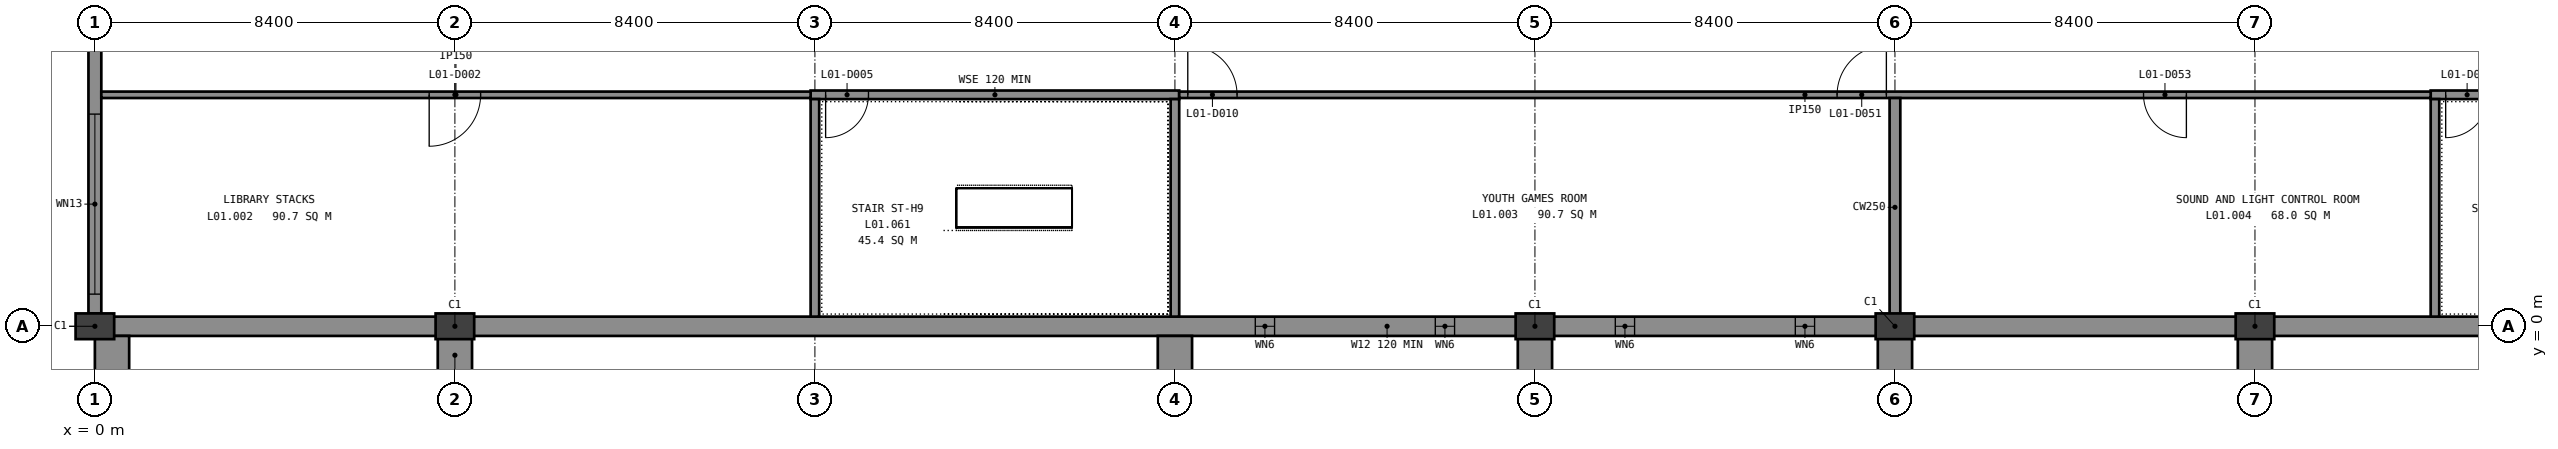
"""IFC4 building model, lengths in metres.
Left out: names, types, materials, properties, quantities, classifications, styles, units other than length and angle.
Written with IfcOpenShell. Run it as: python <this file> out.ifc"""

import sys

from ifc_helpers import new_model, si_unit, direction, frame, frame_2d, origin, origin_2d, place, context, subcontext, project, spatial, rectangle, extrude, element, fill, save


model = new_model("IFC4")
c1 = context("Model", 3, precision=1e-05, world=origin(), true_north=direction((0.0, 1.0)))
c2 = subcontext(c1, "Body", "Model", "MODEL_VIEW")
j1 = project(units=[si_unit("LENGTHUNIT", "METRE"), si_unit("PLANEANGLEUNIT", "RADIAN")], contexts=[c1])
p1 = place(None, origin())
s1 = spatial("IfcSite", under=j1, at=p1, CompositionType="ELEMENT")
p2 = place(p1, origin())
s2 = spatial("IfcBuilding", under=s1, at=p2, CompositionType="ELEMENT")
p3 = place(p2, frame((0.0, 0.0, 5.4)))
s3 = spatial("IfcBuildingStorey", under=s2, at=p3, CompositionType="ELEMENT", Elevation=5.4)
for number, where, z_axis, x_axis in (
    (1, (0.0, 0.0, -0.3), (0.0, 0.0, 1.0), (1.0, 0.0, 0.0)),
    (2, (8.4, 0.0, -0.3), (0.0, 0.0, 1.0), (1.0, 0.0, 0.0)),
    (3, (33.6, 0.0, -0.3), (0.0, 0.0, 1.0), (1.0, 0.0, 0.0)),
    (4, (42.0, 0.0, -0.3), (0.0, 0.0, 1.0), (1.0, 0.0, 0.0)),
    (5, (50.4, 0.0, -0.3), (0.0, 0.0, 1.0), (1.0, 0.0, 0.0)),
):
    element("IfcColumn", number, at=place(p3, frame(where, z_axis=z_axis, x_axis=x_axis)), inside=s3, PredefinedType="PILASTER", context=c2, shape_type="SweptSolid", body=[
        extrude(rectangle(XDim=0.9, YDim=0.6, at=origin_2d()), origin(), (0.0, 0.0, 1.0), 4.55),
    ])
p4 = place(p3, frame((0.0, 0.0, -0.3), z_axis=(0.0, 0.0, 1.0), x_axis=(1.0, 0.0, 0.0)))
e6 = element("IfcWall", 6, at=p4, inside=s3, PredefinedType="SOLIDWALL", context=c2, shape_type="SweptSolid", body=[
    extrude(rectangle(XDim=168.0, YDim=0.45, at=frame_2d((84.0, 0.0))), origin(), (0.0, 0.0, 1.0), 4.55),
])
p5 = place(p4, frame((27.075, 0.0, 1.5)))
e7 = element("IfcOpeningElement", 7, at=p5, cuts=e6, PredefinedType="OPENING", context=c2, shape_type="SweptSolid", body=[
    extrude(rectangle(XDim=0.45, YDim=2.4, at=frame_2d((0.225, 1.2))), frame((0.0, 0.235, 0.0), z_axis=(0.0, -1.0, 0.0), x_axis=(1.0, 0.0, 0.0)), (0.0, 0.0, 1.0), 0.47),
])
p6 = place(p4, frame((31.275, 0.0, 1.5)))
e8 = element("IfcOpeningElement", 8, at=p6, cuts=e6, PredefinedType="OPENING", context=c2, shape_type="SweptSolid", body=[
    extrude(rectangle(XDim=0.45, YDim=2.4, at=frame_2d((0.225, 1.2))), frame((0.0, 0.235, 0.0), z_axis=(0.0, -1.0, 0.0), x_axis=(1.0, 0.0, 0.0)), (0.0, 0.0, 1.0), 0.47),
])
p7 = place(p4, frame((35.475, 0.0, 1.5)))
e9 = element("IfcOpeningElement", 9, at=p7, cuts=e6, PredefinedType="OPENING", context=c2, shape_type="SweptSolid", body=[
    extrude(rectangle(XDim=0.45, YDim=2.4, at=frame_2d((0.225, 1.2))), frame((0.0, 0.235, 0.0), z_axis=(0.0, -1.0, 0.0), x_axis=(1.0, 0.0, 0.0)), (0.0, 0.0, 1.0), 0.47),
])
p8 = place(p4, frame((39.675, 0.0, 1.5)))
e10 = element("IfcOpeningElement", 10, at=p8, cuts=e6, PredefinedType="OPENING", context=c2, shape_type="SweptSolid", body=[
    extrude(rectangle(XDim=0.45, YDim=2.4, at=frame_2d((0.225, 1.2))), frame((0.0, 0.235, 0.0), z_axis=(0.0, -1.0, 0.0), x_axis=(1.0, 0.0, 0.0)), (0.0, 0.0, 1.0), 0.47),
])
p9 = place(p4, frame((94.275, 0.0, 1.5)))
e11 = element("IfcOpeningElement", 11, at=p9, cuts=e6, PredefinedType="OPENING", context=c2, shape_type="SweptSolid", body=[
    extrude(rectangle(XDim=0.45, YDim=2.4, at=frame_2d((0.225, 1.2))), frame((0.0, 0.235, 0.0), z_axis=(0.0, -1.0, 0.0), x_axis=(1.0, 0.0, 0.0)), (0.0, 0.0, 1.0), 0.47),
])
p10 = place(p4, frame((98.475, 0.0, 1.5)))
e12 = element("IfcOpeningElement", 12, at=p10, cuts=e6, PredefinedType="OPENING", context=c2, shape_type="SweptSolid", body=[
    extrude(rectangle(XDim=0.45, YDim=2.4, at=frame_2d((0.225, 1.2))), frame((0.0, 0.235, 0.0), z_axis=(0.0, -1.0, 0.0), x_axis=(1.0, 0.0, 0.0)), (0.0, 0.0, 1.0), 0.47),
])
p11 = place(p4, frame((102.675, 0.0, 1.5)))
e13 = element("IfcOpeningElement", 13, at=p11, cuts=e6, PredefinedType="OPENING", context=c2, shape_type="SweptSolid", body=[
    extrude(rectangle(XDim=0.45, YDim=2.4, at=frame_2d((0.225, 1.2))), frame((0.0, 0.235, 0.0), z_axis=(0.0, -1.0, 0.0), x_axis=(1.0, 0.0, 0.0)), (0.0, 0.0, 1.0), 0.47),
])
p12 = place(p4, frame((106.875, 0.0, 1.5)))
e14 = element("IfcOpeningElement", 14, at=p12, cuts=e6, PredefinedType="OPENING", context=c2, shape_type="SweptSolid", body=[
    extrude(rectangle(XDim=0.45, YDim=2.4, at=frame_2d((0.225, 1.2))), frame((0.0, 0.235, 0.0), z_axis=(0.0, -1.0, 0.0), x_axis=(1.0, 0.0, 0.0)), (0.0, 0.0, 1.0), 0.47),
])
p13 = place(p4, frame((111.075, 0.0, 1.5)))
e15 = element("IfcOpeningElement", 15, at=p13, cuts=e6, PredefinedType="OPENING", context=c2, shape_type="SweptSolid", body=[
    extrude(rectangle(XDim=0.45, YDim=2.4, at=frame_2d((0.225, 1.2))), frame((0.0, 0.235, 0.0), z_axis=(0.0, -1.0, 0.0), x_axis=(1.0, 0.0, 0.0)), (0.0, 0.0, 1.0), 0.47),
])
p14 = place(p4, frame((115.275, 0.0, 1.5)))
e16 = element("IfcOpeningElement", 16, at=p14, cuts=e6, PredefinedType="OPENING", context=c2, shape_type="SweptSolid", body=[
    extrude(rectangle(XDim=0.45, YDim=2.4, at=frame_2d((0.225, 1.2))), frame((0.0, 0.235, 0.0), z_axis=(0.0, -1.0, 0.0), x_axis=(1.0, 0.0, 0.0)), (0.0, 0.0, 1.0), 0.47),
])
p15 = place(p4, frame((127.875, 0.0, 1.5)))
e17 = element("IfcOpeningElement", 17, at=p15, cuts=e6, PredefinedType="OPENING", context=c2, shape_type="SweptSolid", body=[
    extrude(rectangle(XDim=0.45, YDim=2.4, at=frame_2d((0.225, 1.2))), frame((0.0, 0.235, 0.0), z_axis=(0.0, -1.0, 0.0), x_axis=(1.0, 0.0, 0.0)), (0.0, 0.0, 1.0), 0.47),
])
p16 = place(p4, frame((132.075, 0.0, 1.5)))
e18 = element("IfcOpeningElement", 18, at=p16, cuts=e6, PredefinedType="OPENING", context=c2, shape_type="SweptSolid", body=[
    extrude(rectangle(XDim=0.45, YDim=2.4, at=frame_2d((0.225, 1.2))), frame((0.0, 0.235, 0.0), z_axis=(0.0, -1.0, 0.0), x_axis=(1.0, 0.0, 0.0)), (0.0, 0.0, 1.0), 0.47),
])
p17 = place(p4, frame((136.275, 0.0, 1.5)))
e19 = element("IfcOpeningElement", 19, at=p17, cuts=e6, PredefinedType="OPENING", context=c2, shape_type="SweptSolid", body=[
    extrude(rectangle(XDim=0.45, YDim=2.4, at=frame_2d((0.225, 1.2))), frame((0.0, 0.235, 0.0), z_axis=(0.0, -1.0, 0.0), x_axis=(1.0, 0.0, 0.0)), (0.0, 0.0, 1.0), 0.47),
])
p18 = place(p4, frame((140.475, 0.0, 1.5)))
e20 = element("IfcOpeningElement", 20, at=p18, cuts=e6, PredefinedType="OPENING", context=c2, shape_type="SweptSolid", body=[
    extrude(rectangle(XDim=0.45, YDim=2.4, at=frame_2d((0.225, 1.2))), frame((0.0, 0.235, 0.0), z_axis=(0.0, -1.0, 0.0), x_axis=(1.0, 0.0, 0.0)), (0.0, 0.0, 1.0), 0.47),
])
p19 = place(p4, frame((144.675, 0.0, 1.5)))
e21 = element("IfcOpeningElement", 21, at=p19, cuts=e6, PredefinedType="OPENING", context=c2, shape_type="SweptSolid", body=[
    extrude(rectangle(XDim=0.45, YDim=2.4, at=frame_2d((0.225, 1.2))), frame((0.0, 0.235, 0.0), z_axis=(0.0, -1.0, 0.0), x_axis=(1.0, 0.0, 0.0)), (0.0, 0.0, 1.0), 0.47),
])
p20 = place(p4, frame((148.875, 0.0, 1.5)))
e22 = element("IfcOpeningElement", 22, at=p20, cuts=e6, PredefinedType="OPENING", context=c2, shape_type="SweptSolid", body=[
    extrude(rectangle(XDim=0.45, YDim=2.4, at=frame_2d((0.225, 1.2))), frame((0.0, 0.235, 0.0), z_axis=(0.0, -1.0, 0.0), x_axis=(1.0, 0.0, 0.0)), (0.0, 0.0, 1.0), 0.47),
])
p21 = place(p4, frame((153.075, 0.0, 1.5)))
e23 = element("IfcOpeningElement", 23, at=p21, cuts=e6, PredefinedType="OPENING", context=c2, shape_type="SweptSolid", body=[
    extrude(rectangle(XDim=0.45, YDim=2.4, at=frame_2d((0.225, 1.2))), frame((0.0, 0.235, 0.0), z_axis=(0.0, -1.0, 0.0), x_axis=(1.0, 0.0, 0.0)), (0.0, 0.0, 1.0), 0.47),
])
p22 = place(p4, frame((157.275, 0.0, 1.5)))
e24 = element("IfcOpeningElement", 24, at=p22, cuts=e6, PredefinedType="OPENING", context=c2, shape_type="SweptSolid", body=[
    extrude(rectangle(XDim=0.45, YDim=2.4, at=frame_2d((0.225, 1.2))), frame((0.0, 0.235, 0.0), z_axis=(0.0, -1.0, 0.0), x_axis=(1.0, 0.0, 0.0)), (0.0, 0.0, 1.0), 0.47),
])
p23 = place(p3, frame((0.0, 0.3, 0.0), z_axis=(0.0, 0.0, 1.0), x_axis=(0.0, 1.0, 0.0)))
e25 = element("IfcWall", 25, at=p23, inside=s3, PredefinedType="STANDARD", context=c2, shape_type="SweptSolid", body=[
    extrude(rectangle(XDim=7.675, YDim=0.3, at=frame_2d((3.837, 0.0))), origin(), (0.0, 0.0, 1.0), 3.6),
])
p24 = place(p23, frame((0.45, 0.0, 2.4)))
e26 = element("IfcOpeningElement", 26, at=p24, cuts=e25, PredefinedType="OPENING", context=c2, shape_type="SweptSolid", body=[
    extrude(rectangle(XDim=4.2, YDim=0.9, at=frame_2d((2.1, 0.45))), frame((0.0, 0.16, 0.0), z_axis=(0.0, -1.0, 0.0), x_axis=(1.0, 0.0, 0.0)), (0.0, 0.0, 1.0), 0.32),
])
for number, where, z_axis, x_axis in (
    (27, (0.4, -0.225, -0.3), (0.0, 0.0, 1.0), (0.0, -1.0, 0.0)),
    (28, (8.4, -0.225, -0.3), (0.0, 0.0, 1.0), (0.0, -1.0, 0.0)),
    (29, (25.2, -0.225, -0.3), (0.0, 0.0, 1.0), (0.0, -1.0, 0.0)),
    (30, (33.6, -0.225, -0.3), (0.0, 0.0, 1.0), (0.0, -1.0, 0.0)),
    (31, (42.0, -0.225, -0.3), (0.0, 0.0, 1.0), (0.0, -1.0, 0.0)),
    (32, (50.4, -0.225, -0.3), (0.0, 0.0, 1.0), (0.0, -1.0, 0.0)),
):
    element("IfcWall", number, at=place(p3, frame(where, z_axis=z_axis, x_axis=x_axis)), inside=s3, PredefinedType="SOLIDWALL", context=c2, shape_type="SweptSolid", body=[
        extrude(rectangle(XDim=0.9, YDim=0.8, at=frame_2d((0.45, 0.0))), origin(), (0.0, 0.0, 1.0), 4.55),
    ])
p25 = place(p3, frame((54.5, 5.4, -0.3), z_axis=(0.0, 0.0, 1.0), x_axis=(1.0, 0.0, 0.0)))
e33 = element("IfcWall", 33, at=p25, inside=s3, PredefinedType="SHEAR", context=c2, shape_type="SweptSolid", body=[
    extrude(rectangle(XDim=8.6, YDim=0.2, at=frame_2d((4.3, 0.0))), origin(), (0.0, 0.0, 1.0), 4.5),
])
p26 = place(p25, frame((0.35, 0.0, 0.3)))
e34 = element("IfcOpeningElement", 34, at=p26, cuts=e33, PredefinedType="OPENING", context=c2, shape_type="SweptSolid", body=[
    extrude(rectangle(XDim=1.0, YDim=2.1, at=frame_2d((0.5, 1.05))), frame((0.0, 0.11, 0.0), z_axis=(0.0, -1.0, 0.0), x_axis=(1.0, 0.0, 0.0)), (0.0, 0.0, 1.0), 0.22),
])
p27 = place(p3, frame((54.6, 0.225, -0.3), z_axis=(0.0, 0.0, 1.0), x_axis=(0.0, 1.0, 0.0)))
e35 = element("IfcWall", 35, at=p27, inside=s3, PredefinedType="SHEAR", context=c2, shape_type="SweptSolid", body=[
    extrude(rectangle(XDim=5.075, YDim=0.2, at=frame_2d((2.538, 0.0))), origin(), (0.0, 0.0, 1.0), 4.5),
])
p28 = place(p3, frame((16.7, 5.4, -0.3), z_axis=(0.0, 0.0, 1.0), x_axis=(1.0, 0.0, 0.0)))
e36 = element("IfcWall", 36, at=p28, inside=s3, PredefinedType="SHEAR", context=c2, shape_type="SweptSolid", body=[
    extrude(rectangle(XDim=8.6, YDim=0.2, at=frame_2d((4.3, 0.0))), origin(), (0.0, 0.0, 1.0), 4.5),
])
p29 = place(p28, frame((0.35, 0.0, 0.3)))
e37 = element("IfcOpeningElement", 37, at=p29, cuts=e36, PredefinedType="OPENING", context=c2, shape_type="SweptSolid", body=[
    extrude(rectangle(XDim=1.0, YDim=2.1, at=frame_2d((0.5, 1.05))), frame((0.0, 0.11, 0.0), z_axis=(0.0, -1.0, 0.0), x_axis=(1.0, 0.0, 0.0)), (0.0, 0.0, 1.0), 0.22),
])
for number, where, z_axis, x_axis in (
    (38, (16.8, 0.225, -0.3), (0.0, 0.0, 1.0), (0.0, 1.0, 0.0)),
    (39, (25.2, 0.225, -0.3), (0.0, 0.0, 1.0), (0.0, 1.0, 0.0)),
):
    element("IfcWall", number, at=place(p3, frame(where, z_axis=z_axis, x_axis=x_axis)), inside=s3, PredefinedType="SHEAR", context=c2, shape_type="SweptSolid", body=[
        extrude(rectangle(XDim=5.075, YDim=0.2, at=frame_2d((2.538, 0.0))), origin(), (0.0, 0.0, 1.0), 4.5),
    ])
p30 = place(p3, frame((0.15, 5.4, 0.0), z_axis=(0.0, 0.0, 1.0), x_axis=(1.0, 0.0, 0.0)))
e40 = element("IfcWall", 40, at=p30, inside=s3, PredefinedType="PARTITIONING", context=c2, shape_type="SweptSolid", body=[
    extrude(rectangle(XDim=16.55, YDim=0.15, at=frame_2d((8.275, 0.0))), origin(), (0.0, 0.0, 1.0), 4.2),
])
p31 = place(p30, frame((7.65, 0.0, 0.0)))
e41 = element("IfcOpeningElement", 41, at=p31, cuts=e40, PredefinedType="OPENING", context=c2, shape_type="SweptSolid", body=[
    extrude(rectangle(XDim=1.2, YDim=2.1, at=frame_2d((0.6, 1.05))), frame((0.0, 0.085, 0.0), z_axis=(0.0, -1.0, 0.0), x_axis=(1.0, 0.0, 0.0)), (0.0, 0.0, 1.0), 0.17),
])
p32 = place(p3, frame((25.3, 5.4, 0.0), z_axis=(0.0, 0.0, 1.0), x_axis=(1.0, 0.0, 0.0)))
e42 = element("IfcWall", 42, at=p32, inside=s3, PredefinedType="PARTITIONING", context=c2, shape_type="SweptSolid", body=[
    extrude(rectangle(XDim=29.2, YDim=0.15, at=frame_2d((14.6, 0.0))), origin(), (0.0, 0.0, 1.0), 4.2),
])
p33 = place(p32, frame((0.2, 0.0, 0.0)))
e43 = element("IfcOpeningElement", 43, at=p33, cuts=e42, PredefinedType="OPENING", context=c2, shape_type="SweptSolid", body=[
    extrude(rectangle(XDim=1.15, YDim=2.1, at=frame_2d((0.575, 1.05))), frame((0.0, 0.085, 0.0), z_axis=(0.0, -1.0, 0.0), x_axis=(1.0, 0.0, 0.0)), (0.0, 0.0, 1.0), 0.17),
])
p34 = place(p32, frame((15.35, 0.0, 0.0)))
e44 = element("IfcOpeningElement", 44, at=p34, cuts=e42, PredefinedType="OPENING", context=c2, shape_type="SweptSolid", body=[
    extrude(rectangle(XDim=1.15, YDim=2.1, at=frame_2d((0.575, 1.05))), frame((0.0, 0.085, 0.0), z_axis=(0.0, -1.0, 0.0), x_axis=(1.0, 0.0, 0.0)), (0.0, 0.0, 1.0), 0.17),
])
p35 = place(p32, frame((22.5, 0.0, 0.0)))
e45 = element("IfcOpeningElement", 45, at=p35, cuts=e42, PredefinedType="OPENING", context=c2, shape_type="SweptSolid", body=[
    extrude(rectangle(XDim=1.0, YDim=2.1, at=frame_2d((0.5, 1.05))), frame((0.0, 0.085, 0.0), z_axis=(0.0, -1.0, 0.0), x_axis=(1.0, 0.0, 0.0)), (0.0, 0.0, 1.0), 0.17),
])
p36 = place(p3, frame((42.0, 0.225, 0.0), z_axis=(0.0, 0.0, 1.0), x_axis=(0.0, 1.0, 0.0)))
e46 = element("IfcWall", 46, at=p36, inside=s3, PredefinedType="SOLIDWALL", context=c2, shape_type="SweptSolid", body=[
    extrude(rectangle(XDim=5.1, YDim=0.25, at=frame_2d((2.55, 0.0))), origin(), (0.0, 0.0, 1.0), 3.5),
])
p37 = place(p24, origin())
e47 = element("IfcWindow", 47, at=p37, inside=s3, PartitioningType="SINGLE_PANEL", PredefinedType="WINDOW", context=c2, shape_type="SweptSolid", body=[
    extrude(rectangle(XDim=4.2, YDim=0.9, at=frame_2d((2.1, 0.45))), frame((0.0, 0.03, 0.0), z_axis=(0.0, -1.0, 0.0), x_axis=(1.0, 0.0, 0.0)), (0.0, 0.0, 1.0), 0.06),
])
fill(e26, e47)
p38 = place(p5, origin())
e48 = element("IfcWindow", 48, at=p38, inside=s3, PartitioningType="SINGLE_PANEL", PredefinedType="WINDOW", context=c2, shape_type="SweptSolid", body=[
    extrude(rectangle(XDim=0.45, YDim=2.4, at=frame_2d((0.225, 1.2))), frame((0.0, 0.03, 0.0), z_axis=(0.0, -1.0, 0.0), x_axis=(1.0, 0.0, 0.0)), (0.0, 0.0, 1.0), 0.06),
])
fill(e7, e48)
p39 = place(p6, origin())
e49 = element("IfcWindow", 49, at=p39, inside=s3, PartitioningType="SINGLE_PANEL", PredefinedType="WINDOW", context=c2, shape_type="SweptSolid", body=[
    extrude(rectangle(XDim=0.45, YDim=2.4, at=frame_2d((0.225, 1.2))), frame((0.0, 0.03, 0.0), z_axis=(0.0, -1.0, 0.0), x_axis=(1.0, 0.0, 0.0)), (0.0, 0.0, 1.0), 0.06),
])
fill(e8, e49)
p40 = place(p7, origin())
e50 = element("IfcWindow", 50, at=p40, inside=s3, PartitioningType="SINGLE_PANEL", PredefinedType="WINDOW", context=c2, shape_type="SweptSolid", body=[
    extrude(rectangle(XDim=0.45, YDim=2.4, at=frame_2d((0.225, 1.2))), frame((0.0, 0.03, 0.0), z_axis=(0.0, -1.0, 0.0), x_axis=(1.0, 0.0, 0.0)), (0.0, 0.0, 1.0), 0.06),
])
fill(e9, e50)
p41 = place(p8, origin())
e51 = element("IfcWindow", 51, at=p41, inside=s3, PartitioningType="SINGLE_PANEL", PredefinedType="WINDOW", context=c2, shape_type="SweptSolid", body=[
    extrude(rectangle(XDim=0.45, YDim=2.4, at=frame_2d((0.225, 1.2))), frame((0.0, 0.03, 0.0), z_axis=(0.0, -1.0, 0.0), x_axis=(1.0, 0.0, 0.0)), (0.0, 0.0, 1.0), 0.06),
])
fill(e10, e51)
p42 = place(p26, origin())
e52 = element("IfcDoor", 52, at=p42, inside=s3, OperationType="SINGLE_SWING_LEFT", PredefinedType="DOOR", context=c2, shape_type="SweptSolid", body=[
    extrude(rectangle(XDim=1.0, YDim=2.1, at=frame_2d((0.5, 1.05))), frame((0.0, 0.025, 0.0), z_axis=(0.0, -1.0, 0.0), x_axis=(1.0, 0.0, 0.0)), (0.0, 0.0, 1.0), 0.05),
])
fill(e34, e52)
p43 = place(p29, origin())
e53 = element("IfcDoor", 53, at=p43, inside=s3, OperationType="SINGLE_SWING_LEFT", PredefinedType="DOOR", context=c2, shape_type="SweptSolid", body=[
    extrude(rectangle(XDim=1.0, YDim=2.1, at=frame_2d((0.5, 1.05))), frame((0.0, 0.025, 0.0), z_axis=(0.0, -1.0, 0.0), x_axis=(1.0, 0.0, 0.0)), (0.0, 0.0, 1.0), 0.05),
])
fill(e37, e53)
p44 = place(p31, origin())
e54 = element("IfcDoor", 54, at=p44, inside=s3, OperationType="SINGLE_SWING_LEFT", PredefinedType="DOOR", context=c2, shape_type="SweptSolid", body=[
    extrude(rectangle(XDim=1.2, YDim=2.1, at=frame_2d((0.6, 1.05))), frame((0.0, 0.025, 0.0), z_axis=(0.0, -1.0, 0.0), x_axis=(1.0, 0.0, 0.0)), (0.0, 0.0, 1.0), 0.05),
])
fill(e41, e54)
p45 = place(p33, origin())
e55 = element("IfcDoor", 55, at=p45, inside=s3, OperationType="SINGLE_SWING_RIGHT", PredefinedType="DOOR", context=c2, shape_type="SweptSolid", body=[
    extrude(rectangle(XDim=1.15, YDim=2.1, at=frame_2d((0.575, 1.05))), frame((0.0, 0.025, 0.0), z_axis=(0.0, -1.0, 0.0), x_axis=(1.0, 0.0, 0.0)), (0.0, 0.0, 1.0), 0.05),
])
fill(e43, e55)
p46 = place(p34, origin())
e56 = element("IfcDoor", 56, at=p46, inside=s3, OperationType="SINGLE_SWING_LEFT", PredefinedType="DOOR", context=c2, shape_type="SweptSolid", body=[
    extrude(rectangle(XDim=1.15, YDim=2.1, at=frame_2d((0.575, 1.05))), frame((0.0, 0.025, 0.0), z_axis=(0.0, -1.0, 0.0), x_axis=(1.0, 0.0, 0.0)), (0.0, 0.0, 1.0), 0.05),
])
fill(e44, e56)
p47 = place(p35, origin())
e57 = element("IfcDoor", 57, at=p47, inside=s3, OperationType="SINGLE_SWING_RIGHT", PredefinedType="DOOR", context=c2, shape_type="SweptSolid", body=[
    extrude(rectangle(XDim=1.0, YDim=2.1, at=frame_2d((0.5, 1.05))), frame((0.0, 0.025, 0.0), z_axis=(0.0, -1.0, 0.0), x_axis=(1.0, 0.0, 0.0)), (0.0, 0.0, 1.0), 0.05),
])
fill(e45, e57)
save(model, sys.argv[1])
